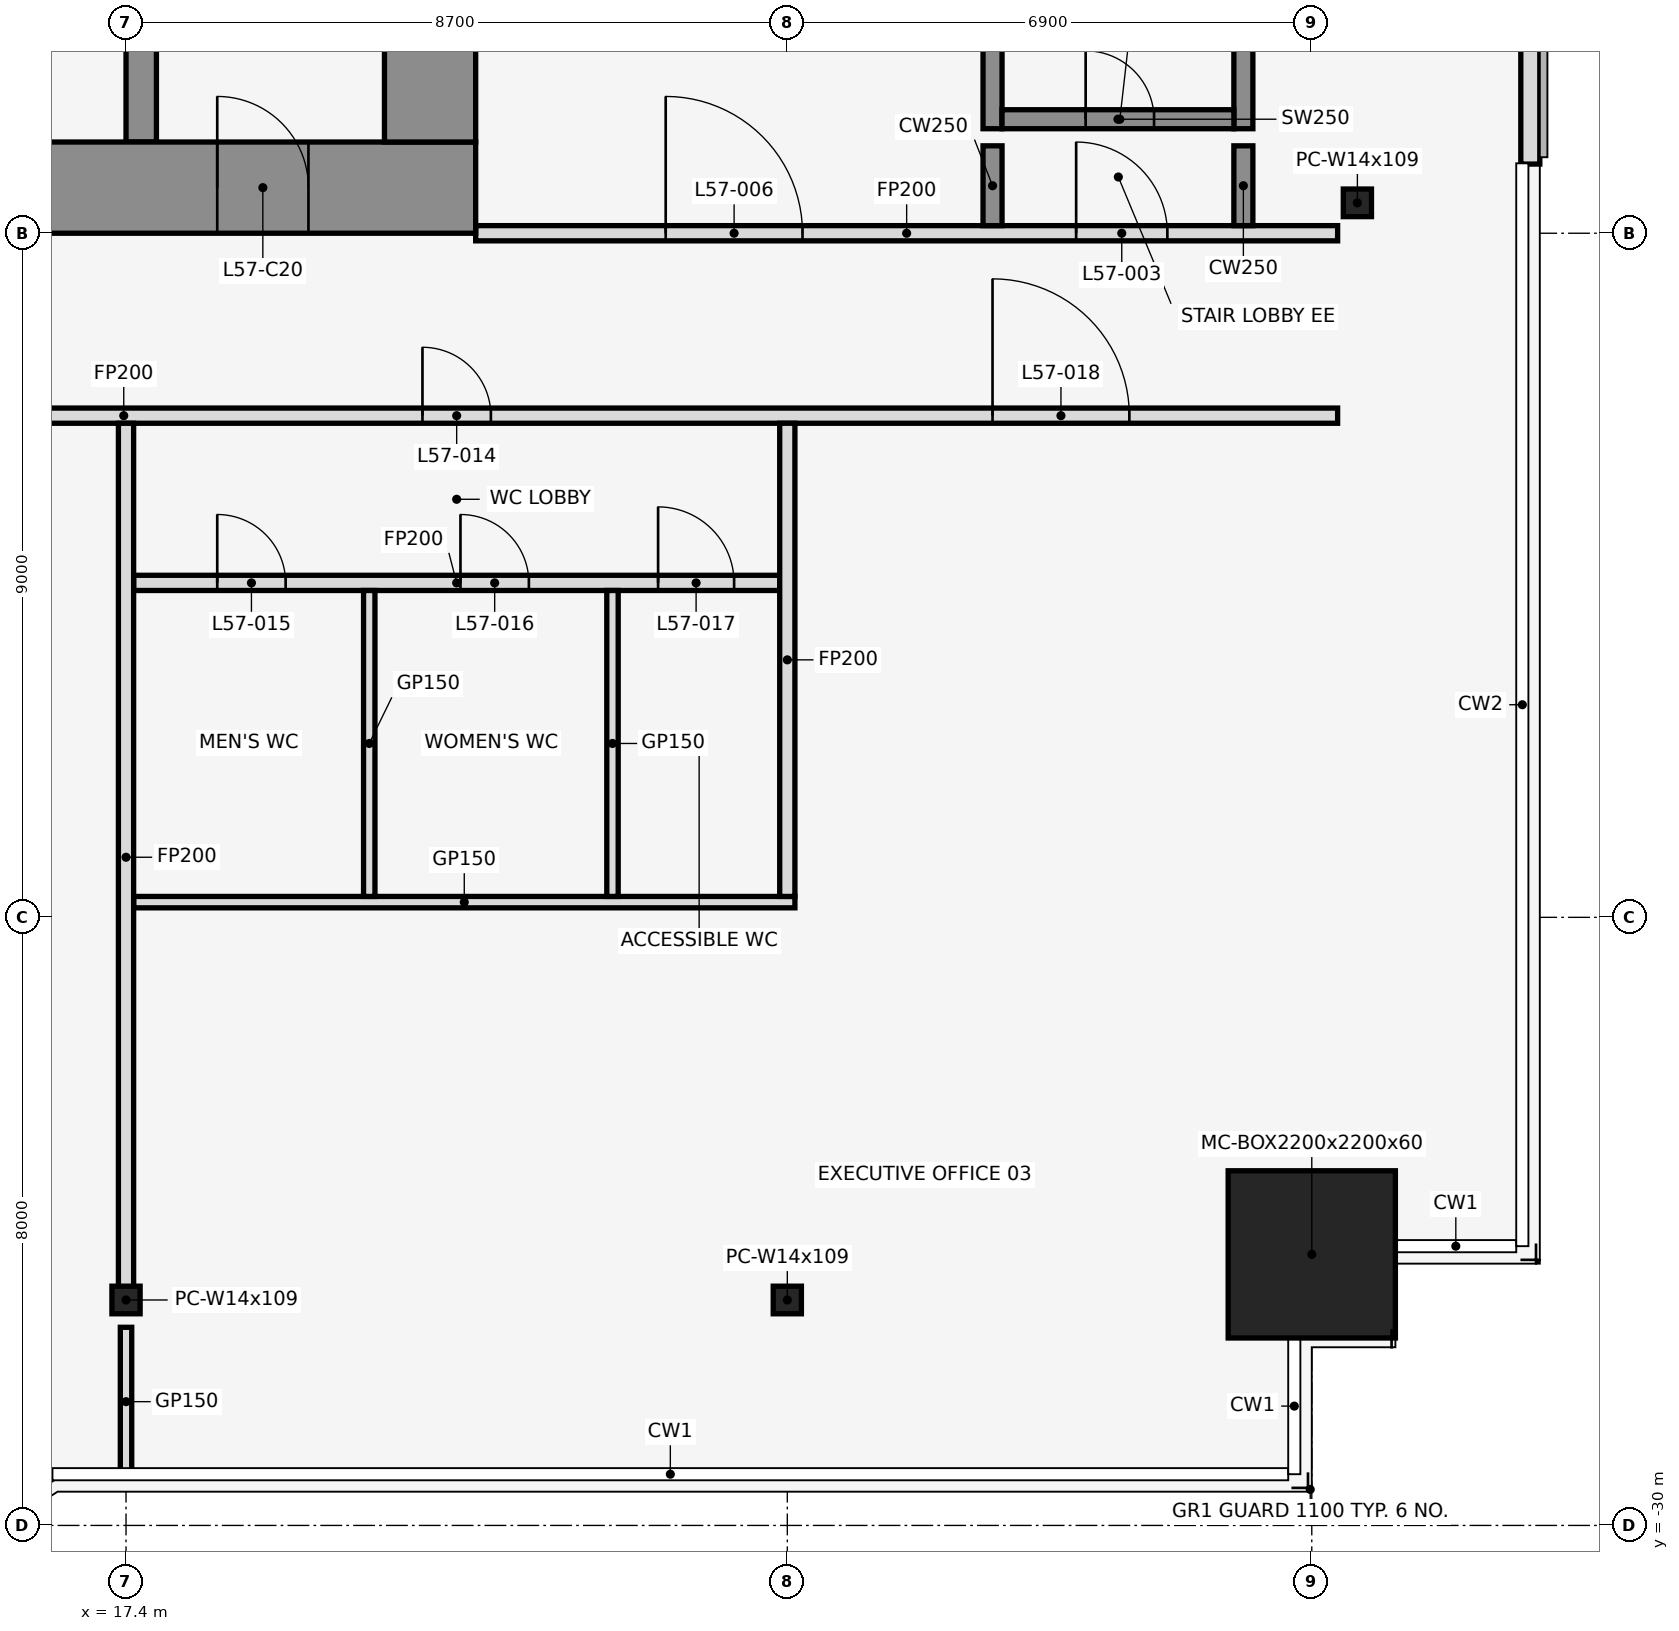
"""IFC4 building model, lengths in metres.
Left out: names, types, materials, properties, quantities, classifications, styles, units other than length and angle.
Written with IfcOpenShell. Run it as: python <this file> out.ifc"""

import sys

from ifc_helpers import new_model, si_unit, direction, frame, frame_2d, origin, origin_2d, place, context, subcontext, project, spatial, rectangle, hollow_rectangle, i_section, extrude, element, fill, save


model = new_model("IFC4")
c1 = context("Model", 3, precision=1e-05, world=origin(), true_north=direction((0.0, 1.0)))
c2 = subcontext(c1, "Body", "Model", "MODEL_VIEW")
j1 = project(units=[si_unit("LENGTHUNIT", "METRE"), si_unit("PLANEANGLEUNIT", "RADIAN")], contexts=[c1])
p1 = place(None, origin())
s1 = spatial("IfcSite", under=j1, at=p1, CompositionType="ELEMENT")
p2 = place(p1, origin())
s2 = spatial("IfcBuilding", under=s1, at=p2, CompositionType="ELEMENT")
p3 = place(p2, frame((0.0, 0.0, 254.0)))
s3 = spatial("IfcBuildingStorey", under=s2, at=p3, CompositionType="ELEMENT", Elevation=254.0)
for number, where, z_axis, x_axis in (
    (1, (17.4, -27.034, 0.0), (0.0, 0.0, 1.0), (1.0, 0.0, 0.0)),
    (2, (26.1, -27.034, 0.0), (0.0, 0.0, 1.0), (1.0, 0.0, 0.0)),
):
    element("IfcColumn", number, at=place(p3, frame(where, z_axis=z_axis, x_axis=x_axis)), inside=s3, PredefinedType="COLUMN", context=c2, shape_type="SweptSolid", body=[
        extrude(i_section(OverallWidth=0.371, OverallDepth=0.363, WebThickness=0.013, FlangeThickness=0.022, at=origin_2d()), origin(), (0.0, 0.0, 1.0), 4.2),
    ])
p4 = place(p3, frame((33.0, -26.434, 0.0), z_axis=(0.0, 0.0, 1.0), x_axis=(1.0, 0.0, 0.0)))
e3 = element("IfcColumn", 3, at=p4, inside=s3, PredefinedType="COLUMN", context=c2, shape_type="SweptSolid", body=[
    extrude(hollow_rectangle(XDim=2.2, YDim=2.2, WallThickness=0.06, at=origin_2d()), origin(), (0.0, 0.0, 1.0), 4.2),
])
p5 = place(p3, frame((33.6, -12.6, 0.0), z_axis=(0.0, 0.0, 1.0), x_axis=(1.0, 0.0, 0.0)))
e4 = element("IfcColumn", 4, at=p5, inside=s3, PredefinedType="COLUMN", context=c2, shape_type="SweptSolid", body=[
    extrude(i_section(OverallWidth=0.371, OverallDepth=0.363, WebThickness=0.013, FlangeThickness=0.022, at=origin_2d()), origin(), (0.0, 0.0, 1.0), 4.2),
])
p6 = place(p3, frame((35.875, -12.09, 0.0), z_axis=(0.0, 0.0, 1.0), x_axis=(0.0, 1.0, 0.0)))
e5 = element("IfcWall", 5, at=p6, inside=s3, PredefinedType="STANDARD", context=c2, shape_type="SweptSolid", body=[
    extrude(rectangle(XDim=9.09, YDim=0.25, at=frame_2d((4.545, 0.0))), origin(), (0.0, 0.0, 1.0), 4.05),
])
p7 = place(p3, frame((28.8, -11.625, 0.0), z_axis=(0.0, 0.0, 1.0), x_axis=(0.0, 1.0, 0.0)))
e6 = element("IfcWall", 6, at=p7, inside=s3, PredefinedType="SHEAR", context=c2, shape_type="SweptSolid", body=[
    extrude(rectangle(XDim=7.25, YDim=0.25, at=frame_2d((3.625, 0.0))), origin(), (0.0, 0.0, 1.0), 4.2),
])
p8 = place(p3, frame((32.1, -11.625, 0.0), z_axis=(0.0, 0.0, 1.0), x_axis=(0.0, 1.0, 0.0)))
e7 = element("IfcWall", 7, at=p8, inside=s3, PredefinedType="SHEAR", context=c2, shape_type="SweptSolid", body=[
    extrude(rectangle(XDim=7.525, YDim=0.25, at=frame_2d((3.762, 0.0))), origin(), (0.0, 0.0, 1.0), 4.2),
])
p9 = place(p3, frame((28.925, -11.5, 0.0), z_axis=(0.0, 0.0, 1.0), x_axis=(1.0, 0.0, 0.0)))
e8 = element("IfcWall", 8, at=p9, inside=s3, PredefinedType="SHEAR", context=c2, shape_type="SweptSolid", body=[
    extrude(rectangle(XDim=3.05, YDim=0.25, at=frame_2d((1.525, 0.0))), origin(), (0.0, 0.0, 1.0), 4.2),
])
p10 = place(p9, frame((1.1, 0.0, 0.0)))
e9 = element("IfcOpeningElement", 9, at=p10, cuts=e8, PredefinedType="OPENING", context=c2, shape_type="SweptSolid", body=[
    extrude(rectangle(XDim=0.9, YDim=2.1, at=frame_2d((0.45, 1.05))), frame((0.0, 0.137, 0.0), z_axis=(0.0, -1.0, 0.0), x_axis=(1.0, 0.0, 0.0)), (0.0, 0.0, 1.0), 0.274),
])
p11 = place(p3, frame((17.5, -21.8, 0.0), z_axis=(0.0, 0.0, 1.0), x_axis=(1.0, 0.0, 0.0)))
e10 = element("IfcWall", 10, at=p11, inside=s3, PredefinedType="PARTITIONING", context=c2, shape_type="SweptSolid", body=[
    extrude(rectangle(XDim=8.7, YDim=0.15, at=frame_2d((4.35, 0.0))), origin(), (0.0, 0.0, 1.0), 3.118),
])
p12 = place(p3, frame((17.5, -17.6, 0.0), z_axis=(0.0, 0.0, 1.0), x_axis=(1.0, 0.0, 0.0)))
e11 = element("IfcWall", 11, at=p12, inside=s3, PredefinedType="PARTITIONING", context=c2, shape_type="SweptSolid", body=[
    extrude(rectangle(XDim=8.5, YDim=0.2, at=frame_2d((4.25, 0.0))), origin(), (0.0, 0.0, 1.0), 3.118),
])
p13 = place(p12, frame((1.1, 0.0, 0.0)))
e12 = element("IfcOpeningElement", 12, at=p13, cuts=e11, PredefinedType="OPENING", context=c2, shape_type="SweptSolid", body=[
    extrude(rectangle(XDim=0.9, YDim=2.1, at=frame_2d((0.45, 1.05))), frame((0.0, 0.112, 0.0), z_axis=(0.0, -1.0, 0.0), x_axis=(1.0, 0.0, 0.0)), (0.0, 0.0, 1.0), 0.224),
])
p14 = place(p12, frame((4.3, 0.0, 0.0)))
e13 = element("IfcOpeningElement", 13, at=p14, cuts=e11, PredefinedType="OPENING", context=c2, shape_type="SweptSolid", body=[
    extrude(rectangle(XDim=0.9, YDim=2.1, at=frame_2d((0.45, 1.05))), frame((0.0, 0.112, 0.0), z_axis=(0.0, -1.0, 0.0), x_axis=(1.0, 0.0, 0.0)), (0.0, 0.0, 1.0), 0.224),
])
p15 = place(p12, frame((6.9, 0.0, 0.0)))
e14 = element("IfcOpeningElement", 14, at=p15, cuts=e11, PredefinedType="OPENING", context=c2, shape_type="SweptSolid", body=[
    extrude(rectangle(XDim=1.0, YDim=2.1, at=frame_2d((0.5, 1.05))), frame((0.0, 0.112, 0.0), z_axis=(0.0, -1.0, 0.0), x_axis=(1.0, 0.0, 0.0)), (0.0, 0.0, 1.0), 0.224),
])
p16 = place(p3, frame((1.4, -15.4, 0.0), z_axis=(0.0, 0.0, 1.0), x_axis=(1.0, 0.0, 0.0)))
e15 = element("IfcWall", 15, at=p16, inside=s3, PredefinedType="PARTITIONING", context=c2, shape_type="SweptSolid", body=[
    extrude(rectangle(XDim=31.94, YDim=0.2, at=frame_2d((15.97, 0.0))), origin(), (0.0, 0.0, 1.0), 3.118),
])
p17 = place(p16, frame((1.7, 0.0, 0.0)))
e16 = element("IfcOpeningElement", 16, at=p17, cuts=e15, PredefinedType="OPENING", context=c2, shape_type="SweptSolid", body=[
    extrude(rectangle(XDim=1.0, YDim=2.1, at=frame_2d((0.5, 1.05))), frame((0.0, 0.112, 0.0), z_axis=(0.0, -1.0, 0.0), x_axis=(1.0, 0.0, 0.0)), (0.0, 0.0, 1.0), 0.224),
])
p18 = place(p16, frame((9.3, 0.0, 0.0)))
e17 = element("IfcOpeningElement", 17, at=p18, cuts=e15, PredefinedType="OPENING", context=c2, shape_type="SweptSolid", body=[
    extrude(rectangle(XDim=1.8, YDim=2.1, at=frame_2d((0.9, 1.05))), frame((0.0, 0.112, 0.0), z_axis=(0.0, -1.0, 0.0), x_axis=(1.0, 0.0, 0.0)), (0.0, 0.0, 1.0), 0.224),
])
p19 = place(p16, frame((19.9, 0.0, 0.0)))
e18 = element("IfcOpeningElement", 18, at=p19, cuts=e15, PredefinedType="OPENING", context=c2, shape_type="SweptSolid", body=[
    extrude(rectangle(XDim=0.9, YDim=2.1, at=frame_2d((0.45, 1.05))), frame((0.0, 0.112, 0.0), z_axis=(0.0, -1.0, 0.0), x_axis=(1.0, 0.0, 0.0)), (0.0, 0.0, 1.0), 0.224),
])
p20 = place(p16, frame((27.4, 0.0, 0.0)))
e19 = element("IfcOpeningElement", 19, at=p20, cuts=e15, PredefinedType="OPENING", context=c2, shape_type="SweptSolid", body=[
    extrude(rectangle(XDim=1.8, YDim=2.1, at=frame_2d((0.9, 1.05))), frame((0.0, 0.112, 0.0), z_axis=(0.0, -1.0, 0.0), x_axis=(1.0, 0.0, 0.0)), (0.0, 0.0, 1.0), 0.224),
])
p21 = place(p3, frame((22.0, -13.0, 0.0), z_axis=(0.0, 0.0, 1.0), x_axis=(1.0, 0.0, 0.0)))
e20 = element("IfcWall", 20, at=p21, inside=s3, PredefinedType="PARTITIONING", context=c2, shape_type="SweptSolid", body=[
    extrude(rectangle(XDim=11.34, YDim=0.2, at=frame_2d((5.67, 0.0))), origin(), (0.0, 0.0, 1.0), 3.118),
])
p22 = place(p21, frame((7.9, 0.0, 0.0)))
e21 = element("IfcOpeningElement", 21, at=p22, cuts=e20, PredefinedType="OPENING", context=c2, shape_type="SweptSolid", body=[
    extrude(rectangle(XDim=1.2, YDim=2.1, at=frame_2d((0.6, 1.05))), frame((0.0, 0.112, 0.0), z_axis=(0.0, -1.0, 0.0), x_axis=(1.0, 0.0, 0.0)), (0.0, 0.0, 1.0), 0.224),
])
p23 = place(p21, frame((2.5, 0.0, 0.0)))
e22 = element("IfcOpeningElement", 22, at=p23, cuts=e20, PredefinedType="OPENING", context=c2, shape_type="SweptSolid", body=[
    extrude(rectangle(XDim=1.8, YDim=2.1, at=frame_2d((0.9, 1.05))), frame((0.0, 0.112, 0.0), z_axis=(0.0, -1.0, 0.0), x_axis=(1.0, 0.0, 0.0)), (0.0, 0.0, 1.0), 0.224),
])
p24 = place(p3, frame((17.4, -29.35, 0.0), z_axis=(0.0, 0.0, 1.0), x_axis=(0.0, 1.0, 0.0)))
e23 = element("IfcWall", 23, at=p24, inside=s3, PredefinedType="PARTITIONING", context=c2, shape_type="SweptSolid", body=[
    extrude(rectangle(XDim=1.957, YDim=0.15, at=frame_2d((0.979, 0.0))), origin(), (0.0, 0.0, 1.0), 3.118),
])
p25 = place(p3, frame((17.4, -26.919, 0.0), z_axis=(0.0, 0.0, 1.0), x_axis=(0.0, 1.0, 0.0)))
e24 = element("IfcWall", 24, at=p25, inside=s3, PredefinedType="PARTITIONING", context=c2, shape_type="SweptSolid", body=[
    extrude(rectangle(XDim=11.419, YDim=0.2, at=frame_2d((5.709, 0.0))), origin(), (0.0, 0.0, 1.0), 3.118),
])
for number, where, z_axis, x_axis in (
    (25, (20.6, -21.725, 0.0), (0.0, 0.0, 1.0), (0.0, 1.0, 0.0)),
    (26, (23.8, -21.725, 0.0), (0.0, 0.0, 1.0), (0.0, 1.0, 0.0)),
):
    element("IfcWall", number, at=place(p3, frame(where, z_axis=z_axis, x_axis=x_axis)), inside=s3, PredefinedType="PARTITIONING", context=c2, shape_type="SweptSolid", body=[
        extrude(rectangle(XDim=4.025, YDim=0.15, at=frame_2d((2.013, 0.0))), origin(), (0.0, 0.0, 1.0), 3.118),
    ])
p26 = place(p3, frame((26.1, -21.725, 0.0), z_axis=(0.0, 0.0, 1.0), x_axis=(0.0, 1.0, 0.0)))
e27 = element("IfcWall", 27, at=p26, inside=s3, PredefinedType="PARTITIONING", context=c2, shape_type="SweptSolid", body=[
    extrude(rectangle(XDim=6.225, YDim=0.2, at=frame_2d((3.113, 0.0))), origin(), (0.0, 0.0, 1.0), 3.118),
])
for number, where, z_axis, x_axis in (
    (28, (28.8, -12.9, 0.0), (0.0, 0.0, 1.0), (0.0, 1.0, 0.0)),
    (29, (32.1, -12.9, 0.0), (0.0, 0.0, 1.0), (0.0, 1.0, 0.0)),
):
    element("IfcWall", number, at=place(p3, frame(where, z_axis=z_axis, x_axis=x_axis)), inside=s3, PredefinedType="SHEAR", context=c2, shape_type="SweptSolid", body=[
        extrude(rectangle(XDim=1.05, YDim=0.25, at=frame_2d((0.525, 0.0))), origin(), (0.0, 0.0, 1.0), 4.2),
    ])
p27 = place(p3, frame((17.6, -11.8, 0.0), z_axis=(0.0, 0.0, 1.0), x_axis=(0.0, 1.0, 0.0)))
e30 = element("IfcWall", 30, at=p27, inside=s3, PredefinedType="SHEAR", context=c2, shape_type="SweptSolid", body=[
    extrude(rectangle(XDim=10.6, YDim=0.4, at=frame_2d((5.3, 0.0))), origin(), (0.0, 0.0, 1.0), 4.2),
])
p28 = place(p27, frame((1.25, 0.0, 0.0)))
e31 = element("IfcOpeningElement", 31, at=p28, cuts=e30, PredefinedType="OPENING", context=c2, shape_type="SweptSolid", body=[
    extrude(rectangle(XDim=1.1, YDim=2.1, at=frame_2d((0.55, 1.05))), frame((0.0, 0.212, 0.0), z_axis=(0.0, -1.0, 0.0), x_axis=(1.0, 0.0, 0.0)), (0.0, 0.0, 1.0), 0.424),
])
p29 = place(p27, frame((3.95, 0.0, 0.0)))
e32 = element("IfcOpeningElement", 32, at=p29, cuts=e30, PredefinedType="OPENING", context=c2, shape_type="SweptSolid", body=[
    extrude(rectangle(XDim=1.1, YDim=2.1, at=frame_2d((0.55, 1.05))), frame((0.0, 0.212, 0.0), z_axis=(0.0, -1.0, 0.0), x_axis=(1.0, 0.0, 0.0)), (0.0, 0.0, 1.0), 0.424),
])
p30 = place(p3, frame((-22.0, -12.4, 0.0), z_axis=(0.0, 0.0, 1.0), x_axis=(1.0, 0.0, 0.0)))
e33 = element("IfcWall", 33, at=p30, inside=s3, PredefinedType="SHEAR", context=c2, shape_type="SweptSolid", body=[
    extrude(rectangle(XDim=44.0, YDim=1.2, at=frame_2d((22.0, 0.0))), origin(), (0.0, 0.0, 1.0), 4.2),
])
p31 = place(p30, frame((2.2, 0.0, 0.0)))
e34 = element("IfcOpeningElement", 34, at=p31, cuts=e33, PredefinedType="OPENING", context=c2, shape_type="SweptSolid", body=[
    extrude(rectangle(XDim=1.2, YDim=2.1, at=frame_2d((0.6, 1.05))), frame((0.0, 0.612, 0.0), z_axis=(0.0, -1.0, 0.0), x_axis=(1.0, 0.0, 0.0)), (0.0, 0.0, 1.0), 1.224),
])
p32 = place(p30, frame((21.4, 0.0, 0.0)))
e35 = element("IfcOpeningElement", 35, at=p32, cuts=e33, PredefinedType="OPENING", context=c2, shape_type="SweptSolid", body=[
    extrude(rectangle(XDim=1.2, YDim=2.1, at=frame_2d((0.6, 1.05))), frame((0.0, 0.612, 0.0), z_axis=(0.0, -1.0, 0.0), x_axis=(1.0, 0.0, 0.0)), (0.0, 0.0, 1.0), 1.224),
])
p33 = place(p30, frame((40.6, 0.0, 0.0)))
e36 = element("IfcOpeningElement", 36, at=p33, cuts=e33, PredefinedType="OPENING", context=c2, shape_type="SweptSolid", body=[
    extrude(rectangle(XDim=1.2, YDim=2.1, at=frame_2d((0.6, 1.05))), frame((0.0, 0.612, 0.0), z_axis=(0.0, -1.0, 0.0), x_axis=(1.0, 0.0, 0.0)), (0.0, 0.0, 1.0), 1.224),
])
p34 = place(p30, frame((16.0, 0.0, 0.0)))
e37 = element("IfcOpeningElement", 37, at=p34, cuts=e33, PredefinedType="OPENING", context=c2, shape_type="SweptSolid", body=[
    extrude(rectangle(XDim=1.8, YDim=2.1, at=frame_2d((0.9, 1.05))), frame((0.0, 0.612, 0.0), z_axis=(0.0, -1.0, 0.0), x_axis=(1.0, 0.0, 0.0)), (0.0, 0.0, 1.0), 1.224),
])
p35 = place(p30, frame((6.3, 0.0, 0.0)))
e38 = element("IfcOpeningElement", 38, at=p35, cuts=e33, PredefinedType="OPENING", context=c2, shape_type="SweptSolid", body=[
    extrude(rectangle(XDim=1.2, YDim=2.1, at=frame_2d((0.6, 1.05))), frame((0.0, 0.612, 0.0), z_axis=(0.0, -1.0, 0.0), x_axis=(1.0, 0.0, 0.0)), (0.0, 0.0, 1.0), 1.224),
])
p36 = place(p30, frame((26.2, 0.0, 0.0)))
e39 = element("IfcOpeningElement", 39, at=p36, cuts=e33, PredefinedType="OPENING", context=c2, shape_type="SweptSolid", body=[
    extrude(rectangle(XDim=1.8, YDim=2.1, at=frame_2d((0.9, 1.05))), frame((0.0, 0.612, 0.0), z_axis=(0.0, -1.0, 0.0), x_axis=(1.0, 0.0, 0.0)), (0.0, 0.0, 1.0), 1.224),
])
p37 = place(p30, frame((36.5, 0.0, 0.0)))
e40 = element("IfcOpeningElement", 40, at=p37, cuts=e33, PredefinedType="OPENING", context=c2, shape_type="SweptSolid", body=[
    extrude(rectangle(XDim=1.2, YDim=2.1, at=frame_2d((0.6, 1.05))), frame((0.0, 0.612, 0.0), z_axis=(0.0, -1.0, 0.0), x_axis=(1.0, 0.0, 0.0)), (0.0, 0.0, 1.0), 1.224),
])
p38 = place(p3, frame((21.4, -11.8, 0.0), z_axis=(0.0, 0.0, 1.0), x_axis=(0.0, 1.0, 0.0)))
e41 = element("IfcWall", 41, at=p38, inside=s3, PredefinedType="SHEAR", context=c2, shape_type="SweptSolid", body=[
    extrude(rectangle(XDim=10.6, YDim=1.2, at=frame_2d((5.3, 0.0))), origin(), (0.0, 0.0, 1.0), 4.2),
])
p39 = place(p22, origin())
e42 = element("IfcDoor", 42, at=p39, inside=s3, OperationType="SINGLE_SWING_RIGHT", PredefinedType="DOOR", context=c2, shape_type="SweptSolid", body=[
    extrude(rectangle(XDim=1.2, YDim=2.1, at=frame_2d((0.6, 1.05))), frame((0.0, 0.025, 0.0), z_axis=(0.0, -1.0, 0.0), x_axis=(1.0, 0.0, 0.0)), (0.0, 0.0, 1.0), 0.05),
])
fill(e21, e42)
p40 = place(p10, origin())
e43 = element("IfcDoor", 43, at=p40, inside=s3, OperationType="SINGLE_SWING_LEFT", PredefinedType="DOOR", context=c2, shape_type="SweptSolid", body=[
    extrude(rectangle(XDim=0.9, YDim=2.1, at=frame_2d((0.45, 1.05))), frame((0.0, 0.025, 0.0), z_axis=(0.0, -1.0, 0.0), x_axis=(1.0, 0.0, 0.0)), (0.0, 0.0, 1.0), 0.05),
])
fill(e9, e43)
p41 = place(p23, origin())
e44 = element("IfcDoor", 44, at=p41, inside=s3, OperationType="SINGLE_SWING_LEFT", PredefinedType="DOOR", context=c2, shape_type="SweptSolid", body=[
    extrude(rectangle(XDim=1.8, YDim=2.1, at=frame_2d((0.9, 1.05))), frame((0.0, 0.025, 0.0), z_axis=(0.0, -1.0, 0.0), x_axis=(1.0, 0.0, 0.0)), (0.0, 0.0, 1.0), 0.05),
])
fill(e22, e44)
p42 = place(p19, frame((0.9, 0.0, 0.0), z_axis=(0.0, 0.0, 1.0), x_axis=(-1.0, 0.0, 0.0)))
e45 = element("IfcDoor", 45, at=p42, inside=s3, OperationType="SINGLE_SWING_RIGHT", PredefinedType="DOOR", context=c2, shape_type="SweptSolid", body=[
    extrude(rectangle(XDim=0.9, YDim=2.1, at=frame_2d((0.45, 1.05))), frame((0.0, 0.025, 0.0), z_axis=(0.0, -1.0, 0.0), x_axis=(1.0, 0.0, 0.0)), (0.0, 0.0, 1.0), 0.05),
])
fill(e18, e45)
p43 = place(p13, frame((0.9, 0.0, 0.0), z_axis=(0.0, 0.0, 1.0), x_axis=(-1.0, 0.0, 0.0)))
e46 = element("IfcDoor", 46, at=p43, inside=s3, OperationType="SINGLE_SWING_RIGHT", PredefinedType="DOOR", context=c2, shape_type="SweptSolid", body=[
    extrude(rectangle(XDim=0.9, YDim=2.1, at=frame_2d((0.45, 1.05))), frame((0.0, 0.025, 0.0), z_axis=(0.0, -1.0, 0.0), x_axis=(1.0, 0.0, 0.0)), (0.0, 0.0, 1.0), 0.05),
])
fill(e12, e46)
p44 = place(p14, frame((0.9, 0.0, 0.0), z_axis=(0.0, 0.0, 1.0), x_axis=(-1.0, 0.0, 0.0)))
e47 = element("IfcDoor", 47, at=p44, inside=s3, OperationType="SINGLE_SWING_LEFT", PredefinedType="DOOR", context=c2, shape_type="SweptSolid", body=[
    extrude(rectangle(XDim=0.9, YDim=2.1, at=frame_2d((0.45, 1.05))), frame((0.0, 0.025, 0.0), z_axis=(0.0, -1.0, 0.0), x_axis=(1.0, 0.0, 0.0)), (0.0, 0.0, 1.0), 0.05),
])
fill(e13, e47)
p45 = place(p15, frame((1.0, 0.0, 0.0), z_axis=(0.0, 0.0, 1.0), x_axis=(-1.0, 0.0, 0.0)))
e48 = element("IfcDoor", 48, at=p45, inside=s3, OperationType="SINGLE_SWING_RIGHT", PredefinedType="DOOR", context=c2, shape_type="SweptSolid", body=[
    extrude(rectangle(XDim=1.0, YDim=2.1, at=frame_2d((0.5, 1.05))), frame((0.0, 0.025, 0.0), z_axis=(0.0, -1.0, 0.0), x_axis=(1.0, 0.0, 0.0)), (0.0, 0.0, 1.0), 0.05),
])
fill(e14, e48)
p46 = place(p20, origin())
e49 = element("IfcDoor", 49, at=p46, inside=s3, OperationType="SINGLE_SWING_LEFT", PredefinedType="DOOR", context=c2, shape_type="SweptSolid", body=[
    extrude(rectangle(XDim=1.8, YDim=2.1, at=frame_2d((0.9, 1.05))), frame((0.0, 0.025, 0.0), z_axis=(0.0, -1.0, 0.0), x_axis=(1.0, 0.0, 0.0)), (0.0, 0.0, 1.0), 0.05),
])
fill(e19, e49)
p47 = place(p33, frame((1.2, 0.0, 0.0), z_axis=(0.0, 0.0, 1.0), x_axis=(-1.0, 0.0, 0.0)))
e50 = element("IfcDoor", 50, at=p47, inside=s3, OperationType="SINGLE_SWING_RIGHT", PredefinedType="DOOR", context=c2, shape_type="SweptSolid", body=[
    extrude(rectangle(XDim=1.2, YDim=2.1, at=frame_2d((0.6, 1.05))), frame((0.0, 0.025, 0.0), z_axis=(0.0, -1.0, 0.0), x_axis=(1.0, 0.0, 0.0)), (0.0, 0.0, 1.0), 0.05),
])
fill(e36, e50)
save(model, sys.argv[1])
